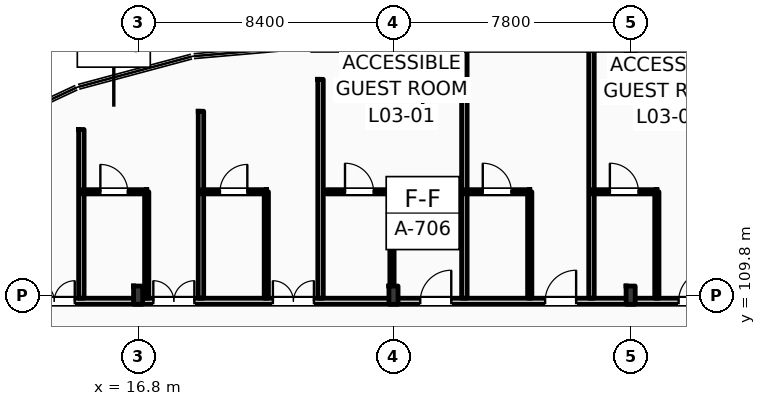
"""IFC4 building model, lengths in metres.
Left out: names, types, materials, properties, quantities, classifications, styles, units other than length and angle.
Written with IfcOpenShell. Run it as: python <this file> out.ifc"""

import sys

from ifc_helpers import new_model, si_unit, direction, frame, frame_2d, origin, origin_2d, place, context, subcontext, project, spatial, rectangle, i_section, extrude, element, fill, save


model = new_model("IFC4")
c1 = context("Model", 3, precision=1e-05, world=origin(), true_north=direction((0.0, 1.0)))
c2 = subcontext(c1, "Body", "Model", "MODEL_VIEW")
j1 = project(units=[si_unit("LENGTHUNIT", "METRE"), si_unit("PLANEANGLEUNIT", "RADIAN")], contexts=[c1])
p1 = place(None, origin())
s1 = spatial("IfcSite", under=j1, at=p1, CompositionType="ELEMENT")
p2 = place(p1, origin())
s2 = spatial("IfcBuilding", under=s1, at=p2, CompositionType="ELEMENT")
p3 = place(p2, frame((0.0, 0.0, 16.2)))
s3 = spatial("IfcBuildingStorey", under=s2, at=p3, CompositionType="ELEMENT", Elevation=16.2)
for number, where, z_axis, x_axis in (
    (1, (16.8, 109.8, 0.0), (0.0, 0.0, 1.0), (1.0, 0.0, 0.0)),
    (2, (25.2, 109.8, 0.0), (0.0, 0.0, 1.0), (1.0, 0.0, 0.0)),
):
    element("IfcColumn", number, at=place(p3, frame(where, z_axis=z_axis, x_axis=x_axis)), inside=s3, PredefinedType="COLUMN", context=c2, shape_type="SweptSolid", body=[
        extrude(i_section(OverallWidth=0.3, OverallDepth=0.6, WebThickness=0.015, FlangeThickness=0.03, FilletRadius=0.027, at=origin_2d()), origin(), (0.0, 0.0, 1.0), 4.2),
    ])
p4 = place(p3, frame((25.2, 118.0, 0.0), z_axis=(0.0, 0.0, 1.0), x_axis=(1.0, 0.0, 0.0)))
e3 = element("IfcColumn", 3, at=p4, inside=s3, PredefinedType="COLUMN", context=c2, shape_type="SweptSolid", body=[
    extrude(i_section(OverallWidth=0.3, OverallDepth=0.55, WebThickness=0.015, FlangeThickness=0.029, FilletRadius=0.027, at=origin_2d()), origin(), (0.0, 0.0, 1.0), 4.2),
])
p5 = place(p3, frame((33.0, 109.8, 0.0), z_axis=(0.0, 0.0, 1.0), x_axis=(1.0, 0.0, 0.0)))
e4 = element("IfcColumn", 4, at=p5, inside=s3, PredefinedType="COLUMN", context=c2, shape_type="SweptSolid", body=[
    extrude(i_section(OverallWidth=0.3, OverallDepth=0.6, WebThickness=0.015, FlangeThickness=0.03, FilletRadius=0.027, at=origin_2d()), origin(), (0.0, 0.0, 1.0), 4.2),
])
p6 = place(p3, frame((33.0, 118.0, 0.0), z_axis=(0.0, 0.0, 1.0), x_axis=(1.0, 0.0, 0.0)))
e5 = element("IfcColumn", 5, at=p6, inside=s3, PredefinedType="COLUMN", context=c2, shape_type="SweptSolid", body=[
    extrude(i_section(OverallWidth=0.3, OverallDepth=0.55, WebThickness=0.015, FlangeThickness=0.029, FilletRadius=0.027, at=origin_2d()), origin(), (0.0, 0.0, 1.0), 4.2),
])
p7 = place(p3, frame((10.65, 109.6, 0.0), z_axis=(0.0, 0.0, 1.0), x_axis=(1.0, 0.0, 0.0)))
e6 = element("IfcWall", 6, at=p7, inside=s3, PredefinedType="PARTITIONING", context=c2, shape_type="SweptSolid", body=[
    extrude(rectangle(XDim=109.21, YDim=0.2, at=frame_2d((54.605, 0.0))), origin(), (0.0, 0.0, 1.0), 3.36),
])
p8 = place(p7, frame((15.43, 0.0, 0.0)))
e7 = element("IfcOpeningElement", 7, at=p8, cuts=e6, PredefinedType="OPENING", context=c2, shape_type="SweptSolid", body=[
    extrude(rectangle(XDim=1.02, YDim=2.2, at=frame_2d((0.51, 1.1))), frame((0.0, 0.11, 0.0), z_axis=(0.0, -1.0, 0.0), x_axis=(1.0, 0.0, 0.0)), (0.0, 0.0, 1.0), 0.22),
])
p9 = place(p7, frame((19.537, 0.0, 0.0)))
e8 = element("IfcOpeningElement", 8, at=p9, cuts=e6, PredefinedType="OPENING", context=c2, shape_type="SweptSolid", body=[
    extrude(rectangle(XDim=1.02, YDim=2.2, at=frame_2d((0.51, 1.1))), frame((0.0, 0.11, 0.0), z_axis=(0.0, -1.0, 0.0), x_axis=(1.0, 0.0, 0.0)), (0.0, 0.0, 1.0), 0.22),
])
p10 = place(p7, frame((23.928, 0.0, 0.0)))
e9 = element("IfcOpeningElement", 9, at=p10, cuts=e6, PredefinedType="OPENING", context=c2, shape_type="SweptSolid", body=[
    extrude(rectangle(XDim=1.02, YDim=2.2, at=frame_2d((0.51, 1.1))), frame((0.0, 0.11, 0.0), z_axis=(0.0, -1.0, 0.0), x_axis=(1.0, 0.0, 0.0)), (0.0, 0.0, 1.0), 0.22),
])
p11 = place(p7, frame((26.169, 0.0, 0.0)))
e10 = element("IfcOpeningElement", 10, at=p11, cuts=e6, PredefinedType="OPENING", context=c2, shape_type="SweptSolid", body=[
    extrude(rectangle(XDim=1.02, YDim=2.2, at=frame_2d((0.51, 1.1))), frame((0.0, 0.11, 0.0), z_axis=(0.0, -1.0, 0.0), x_axis=(1.0, 0.0, 0.0)), (0.0, 0.0, 1.0), 0.22),
])
p12 = place(p7, frame((32.739, 0.0, 0.0)))
e11 = element("IfcOpeningElement", 11, at=p12, cuts=e6, PredefinedType="OPENING", context=c2, shape_type="SweptSolid", body=[
    extrude(rectangle(XDim=0.96, YDim=2.2, at=frame_2d((0.48, 1.1))), frame((0.0, 0.11, 0.0), z_axis=(0.0, -1.0, 0.0), x_axis=(1.0, 0.0, 0.0)), (0.0, 0.0, 1.0), 0.22),
])
p13 = place(p7, frame((34.98, 0.0, 0.0)))
e12 = element("IfcOpeningElement", 12, at=p13, cuts=e6, PredefinedType="OPENING", context=c2, shape_type="SweptSolid", body=[
    extrude(rectangle(XDim=0.96, YDim=2.2, at=frame_2d((0.48, 1.1))), frame((0.0, 0.11, 0.0), z_axis=(0.0, -1.0, 0.0), x_axis=(1.0, 0.0, 0.0)), (0.0, 0.0, 1.0), 0.22),
])
p14 = place(p7, frame((41.521, 0.0, 0.0)))
e13 = element("IfcOpeningElement", 13, at=p14, cuts=e6, PredefinedType="OPENING", context=c2, shape_type="SweptSolid", body=[
    extrude(rectangle(XDim=0.96, YDim=2.2, at=frame_2d((0.48, 1.1))), frame((0.0, 0.11, 0.0), z_axis=(0.0, -1.0, 0.0), x_axis=(1.0, 0.0, 0.0)), (0.0, 0.0, 1.0), 0.22),
])
p15 = place(p7, frame((43.512, 0.0, 0.0)))
e14 = element("IfcOpeningElement", 14, at=p15, cuts=e6, PredefinedType="OPENING", context=c2, shape_type="SweptSolid", body=[
    extrude(rectangle(XDim=0.96, YDim=2.2, at=frame_2d((0.48, 1.1))), frame((0.0, 0.11, 0.0), z_axis=(0.0, -1.0, 0.0), x_axis=(1.0, 0.0, 0.0)), (0.0, 0.0, 1.0), 0.22),
])
p16 = place(p7, frame((50.303, 0.0, 0.0)))
e15 = element("IfcOpeningElement", 15, at=p16, cuts=e6, PredefinedType="OPENING", context=c2, shape_type="SweptSolid", body=[
    extrude(rectangle(XDim=0.96, YDim=2.2, at=frame_2d((0.48, 1.1))), frame((0.0, 0.11, 0.0), z_axis=(0.0, -1.0, 0.0), x_axis=(1.0, 0.0, 0.0)), (0.0, 0.0, 1.0), 0.22),
])
p17 = place(p7, frame((54.944, 0.0, 0.0)))
e16 = element("IfcOpeningElement", 16, at=p17, cuts=e6, PredefinedType="OPENING", context=c2, shape_type="SweptSolid", body=[
    extrude(rectangle(XDim=0.96, YDim=2.2, at=frame_2d((0.48, 1.1))), frame((0.0, 0.11, 0.0), z_axis=(0.0, -1.0, 0.0), x_axis=(1.0, 0.0, 0.0)), (0.0, 0.0, 1.0), 0.22),
])
p18 = place(p7, frame((59.085, 0.0, 0.0)))
e17 = element("IfcOpeningElement", 17, at=p18, cuts=e6, PredefinedType="OPENING", context=c2, shape_type="SweptSolid", body=[
    extrude(rectangle(XDim=0.96, YDim=2.2, at=frame_2d((0.48, 1.1))), frame((0.0, 0.11, 0.0), z_axis=(0.0, -1.0, 0.0), x_axis=(1.0, 0.0, 0.0)), (0.0, 0.0, 1.0), 0.22),
])
p19 = place(p7, frame((63.476, 0.0, 0.0)))
e18 = element("IfcOpeningElement", 18, at=p19, cuts=e6, PredefinedType="OPENING", context=c2, shape_type="SweptSolid", body=[
    extrude(rectangle(XDim=0.96, YDim=2.2, at=frame_2d((0.48, 1.1))), frame((0.0, 0.11, 0.0), z_axis=(0.0, -1.0, 0.0), x_axis=(1.0, 0.0, 0.0)), (0.0, 0.0, 1.0), 0.22),
])
p20 = place(p7, frame((65.716, 0.0, 0.0)))
e19 = element("IfcOpeningElement", 19, at=p20, cuts=e6, PredefinedType="OPENING", context=c2, shape_type="SweptSolid", body=[
    extrude(rectangle(XDim=0.96, YDim=2.2, at=frame_2d((0.48, 1.1))), frame((0.0, 0.11, 0.0), z_axis=(0.0, -1.0, 0.0), x_axis=(1.0, 0.0, 0.0)), (0.0, 0.0, 1.0), 0.22),
])
p21 = place(p7, frame((72.257, 0.0, 0.0)))
e20 = element("IfcOpeningElement", 20, at=p21, cuts=e6, PredefinedType="OPENING", context=c2, shape_type="SweptSolid", body=[
    extrude(rectangle(XDim=0.96, YDim=2.2, at=frame_2d((0.48, 1.1))), frame((0.0, 0.11, 0.0), z_axis=(0.0, -1.0, 0.0), x_axis=(1.0, 0.0, 0.0)), (0.0, 0.0, 1.0), 0.22),
])
p22 = place(p7, frame((74.498, 0.0, 0.0)))
e21 = element("IfcOpeningElement", 21, at=p22, cuts=e6, PredefinedType="OPENING", context=c2, shape_type="SweptSolid", body=[
    extrude(rectangle(XDim=0.96, YDim=2.2, at=frame_2d((0.48, 1.1))), frame((0.0, 0.11, 0.0), z_axis=(0.0, -1.0, 0.0), x_axis=(1.0, 0.0, 0.0)), (0.0, 0.0, 1.0), 0.22),
])
p23 = place(p7, frame((81.039, 0.0, 0.0)))
e22 = element("IfcOpeningElement", 22, at=p23, cuts=e6, PredefinedType="OPENING", context=c2, shape_type="SweptSolid", body=[
    extrude(rectangle(XDim=0.96, YDim=2.2, at=frame_2d((0.48, 1.1))), frame((0.0, 0.11, 0.0), z_axis=(0.0, -1.0, 0.0), x_axis=(1.0, 0.0, 0.0)), (0.0, 0.0, 1.0), 0.22),
])
p24 = place(p7, frame((85.68, 0.0, 0.0)))
e23 = element("IfcOpeningElement", 23, at=p24, cuts=e6, PredefinedType="OPENING", context=c2, shape_type="SweptSolid", body=[
    extrude(rectangle(XDim=0.96, YDim=2.2, at=frame_2d((0.48, 1.1))), frame((0.0, 0.11, 0.0), z_axis=(0.0, -1.0, 0.0), x_axis=(1.0, 0.0, 0.0)), (0.0, 0.0, 1.0), 0.22),
])
p25 = place(p7, frame((89.82, 0.0, 0.0)))
e24 = element("IfcOpeningElement", 24, at=p25, cuts=e6, PredefinedType="OPENING", context=c2, shape_type="SweptSolid", body=[
    extrude(rectangle(XDim=0.96, YDim=2.2, at=frame_2d((0.48, 1.1))), frame((0.0, 0.11, 0.0), z_axis=(0.0, -1.0, 0.0), x_axis=(1.0, 0.0, 0.0)), (0.0, 0.0, 1.0), 0.22),
])
p26 = place(p7, frame((94.211, 0.0, 0.0)))
e25 = element("IfcOpeningElement", 25, at=p26, cuts=e6, PredefinedType="OPENING", context=c2, shape_type="SweptSolid", body=[
    extrude(rectangle(XDim=0.96, YDim=2.2, at=frame_2d((0.48, 1.1))), frame((0.0, 0.11, 0.0), z_axis=(0.0, -1.0, 0.0), x_axis=(1.0, 0.0, 0.0)), (0.0, 0.0, 1.0), 0.22),
])
p27 = place(p7, frame((98.602, 0.0, 0.0)))
e26 = element("IfcOpeningElement", 26, at=p27, cuts=e6, PredefinedType="OPENING", context=c2, shape_type="SweptSolid", body=[
    extrude(rectangle(XDim=0.96, YDim=2.2, at=frame_2d((0.48, 1.1))), frame((0.0, 0.11, 0.0), z_axis=(0.0, -1.0, 0.0), x_axis=(1.0, 0.0, 0.0)), (0.0, 0.0, 1.0), 0.22),
])
p28 = place(p7, frame((102.993, 0.0, 0.0)))
e27 = element("IfcOpeningElement", 27, at=p28, cuts=e6, PredefinedType="OPENING", context=c2, shape_type="SweptSolid", body=[
    extrude(rectangle(XDim=0.96, YDim=2.2, at=frame_2d((0.48, 1.1))), frame((0.0, 0.11, 0.0), z_axis=(0.0, -1.0, 0.0), x_axis=(1.0, 0.0, 0.0)), (0.0, 0.0, 1.0), 0.22),
])
p29 = place(p7, frame((105.269, 0.0, 0.0)))
e28 = element("IfcOpeningElement", 28, at=p29, cuts=e6, PredefinedType="OPENING", context=c2, shape_type="SweptSolid", body=[
    extrude(rectangle(XDim=0.96, YDim=2.2, at=frame_2d((0.48, 1.1))), frame((0.0, 0.11, 0.0), z_axis=(0.0, -1.0, 0.0), x_axis=(1.0, 0.0, 0.0)), (0.0, 0.0, 1.0), 0.22),
])
p30 = place(p7, frame((2.716, 0.0, 0.0)))
e29 = element("IfcOpeningElement", 29, at=p30, cuts=e6, PredefinedType="OPENING", context=c2, shape_type="SweptSolid", body=[
    extrude(rectangle(XDim=1.35, YDim=2.25, at=frame_2d((0.675, 1.125))), frame((0.0, 0.11, 0.0), z_axis=(0.0, -1.0, 0.0), x_axis=(1.0, 0.0, 0.0)), (0.0, 0.0, 1.0), 0.22),
])
p31 = place(p7, frame((6.65, 0.0, 0.0)))
e30 = element("IfcOpeningElement", 30, at=p31, cuts=e6, PredefinedType="OPENING", context=c2, shape_type="SweptSolid", body=[
    extrude(rectangle(XDim=1.35, YDim=2.25, at=frame_2d((0.675, 1.125))), frame((0.0, 0.11, 0.0), z_axis=(0.0, -1.0, 0.0), x_axis=(1.0, 0.0, 0.0)), (0.0, 0.0, 1.0), 0.22),
])
p32 = place(p7, frame((10.583, 0.0, 0.0)))
e31 = element("IfcOpeningElement", 31, at=p32, cuts=e6, PredefinedType="OPENING", context=c2, shape_type="SweptSolid", body=[
    extrude(rectangle(XDim=1.35, YDim=2.25, at=frame_2d((0.675, 1.125))), frame((0.0, 0.11, 0.0), z_axis=(0.0, -1.0, 0.0), x_axis=(1.0, 0.0, 0.0)), (0.0, 0.0, 1.0), 0.22),
])
p33 = place(p3, frame((27.531, 109.7, 0.0), z_axis=(0.0, 0.0, 1.0), x_axis=(0.0, 1.0, 0.0)))
e32 = element("IfcWall", 32, at=p33, inside=s3, PredefinedType="PARTITIONING", context=c2, shape_type="SweptSolid", body=[
    extrude(rectangle(XDim=8.15, YDim=0.18, at=frame_2d((4.075, 0.0))), origin(), (0.0, 0.0, 1.0), 3.92),
])
p34 = place(p3, frame((25.15, 109.7, 0.0), z_axis=(0.0, 0.0, 1.0), x_axis=(0.0, 1.0, 0.0)))
e33 = element("IfcWall", 33, at=p34, inside=s3, PredefinedType="PARTITIONING", context=c2, shape_type="SweptSolid", body=[
    extrude(rectangle(XDim=3.5, YDim=0.14, at=frame_2d((1.75, 0.0))), origin(), (0.0, 0.0, 1.0), 3.51),
])
p35 = place(p3, frame((23.0, 113.2, 0.0), z_axis=(0.0, 0.0, 1.0), x_axis=(1.0, 0.0, 0.0)))
e34 = element("IfcWall", 34, at=p35, inside=s3, PredefinedType="PARTITIONING", context=c2, shape_type="SweptSolid", body=[
    extrude(rectangle(XDim=2.15, YDim=0.14, at=frame_2d((1.075, 0.0))), origin(), (0.0, 0.0, 1.0), 3.92),
])
p36 = place(p35, frame((0.605, 0.0, 0.0)))
e35 = element("IfcOpeningElement", 35, at=p36, cuts=e34, PredefinedType="OPENING", context=c2, shape_type="SweptSolid", body=[
    extrude(rectangle(XDim=0.94, YDim=2.15, at=frame_2d((0.47, 1.075))), frame((0.0, 0.08, 0.0), z_axis=(0.0, -1.0, 0.0), x_axis=(1.0, 0.0, 0.0)), (0.0, 0.0, 1.0), 0.16),
])
p37 = place(p3, frame((31.712, 109.7, 0.0), z_axis=(0.0, 0.0, 1.0), x_axis=(0.0, 1.0, 0.0)))
e36 = element("IfcWall", 36, at=p37, inside=s3, PredefinedType="PARTITIONING", context=c2, shape_type="SweptSolid", body=[
    extrude(rectangle(XDim=8.15, YDim=0.18, at=frame_2d((4.075, 0.0))), origin(), (0.0, 0.0, 1.0), 3.92),
])
p38 = place(p3, frame((29.681, 109.7, 0.0), z_axis=(0.0, 0.0, 1.0), x_axis=(0.0, 1.0, 0.0)))
e37 = element("IfcWall", 37, at=p38, inside=s3, PredefinedType="PARTITIONING", context=c2, shape_type="SweptSolid", body=[
    extrude(rectangle(XDim=3.5, YDim=0.14, at=frame_2d((1.75, 0.0))), origin(), (0.0, 0.0, 1.0), 3.92),
])
p39 = place(p3, frame((27.531, 113.2, 0.0), z_axis=(0.0, 0.0, 1.0), x_axis=(1.0, 0.0, 0.0)))
e38 = element("IfcWall", 38, at=p39, inside=s3, PredefinedType="PARTITIONING", context=c2, shape_type="SweptSolid", body=[
    extrude(rectangle(XDim=2.15, YDim=0.14, at=frame_2d((1.075, 0.0))), origin(), (0.0, 0.0, 1.0), 3.92),
])
p40 = place(p39, frame((0.605, 0.0, 0.0)))
e39 = element("IfcOpeningElement", 39, at=p40, cuts=e38, PredefinedType="OPENING", context=c2, shape_type="SweptSolid", body=[
    extrude(rectangle(XDim=0.94, YDim=2.15, at=frame_2d((0.47, 1.075))), frame((0.0, 0.08, 0.0), z_axis=(0.0, -1.0, 0.0), x_axis=(1.0, 0.0, 0.0)), (0.0, 0.0, 1.0), 0.16),
])
p41 = place(p3, frame((33.862, 109.7, 0.0), z_axis=(0.0, 0.0, 1.0), x_axis=(0.0, 1.0, 0.0)))
e40 = element("IfcWall", 40, at=p41, inside=s3, PredefinedType="PARTITIONING", context=c2, shape_type="SweptSolid", body=[
    extrude(rectangle(XDim=3.5, YDim=0.14, at=frame_2d((1.75, 0.0))), origin(), (0.0, 0.0, 1.0), 3.92),
])
p42 = place(p3, frame((31.712, 113.2, 0.0), z_axis=(0.0, 0.0, 1.0), x_axis=(1.0, 0.0, 0.0)))
e41 = element("IfcWall", 41, at=p42, inside=s3, PredefinedType="PARTITIONING", context=c2, shape_type="SweptSolid", body=[
    extrude(rectangle(XDim=2.15, YDim=0.14, at=frame_2d((1.075, 0.0))), origin(), (0.0, 0.0, 1.0), 3.92),
])
p43 = place(p42, frame((0.605, 0.0, 0.0)))
e42 = element("IfcOpeningElement", 42, at=p43, cuts=e41, PredefinedType="OPENING", context=c2, shape_type="SweptSolid", body=[
    extrude(rectangle(XDim=0.94, YDim=2.15, at=frame_2d((0.47, 1.075))), frame((0.0, 0.08, 0.0), z_axis=(0.0, -1.0, 0.0), x_axis=(1.0, 0.0, 0.0)), (0.0, 0.0, 1.0), 0.16),
])
p44 = place(p3, frame((14.933, 109.7, 0.0), z_axis=(0.0, 0.0, 1.0), x_axis=(0.0, 1.0, 0.0)))
e43 = element("IfcWall", 43, at=p44, inside=s3, PredefinedType="PARTITIONING", context=c2, shape_type="SweptSolid", body=[
    extrude(rectangle(XDim=5.55, YDim=0.18, at=frame_2d((2.775, 0.0))), origin(), (0.0, 0.0, 1.0), 3.92),
])
p45 = place(p3, frame((18.867, 109.7, 0.0), z_axis=(0.0, 0.0, 1.0), x_axis=(0.0, 1.0, 0.0)))
e44 = element("IfcWall", 44, at=p45, inside=s3, PredefinedType="PARTITIONING", context=c2, shape_type="SweptSolid", body=[
    extrude(rectangle(XDim=6.15, YDim=0.18, at=frame_2d((3.075, 0.0))), origin(), (0.0, 0.0, 1.0), 3.92),
])
p46 = place(p3, frame((17.083, 109.7, 0.0), z_axis=(0.0, 0.0, 1.0), x_axis=(0.0, 1.0, 0.0)))
e45 = element("IfcWall", 45, at=p46, inside=s3, PredefinedType="PARTITIONING", context=c2, shape_type="SweptSolid", body=[
    extrude(rectangle(XDim=3.5, YDim=0.14, at=frame_2d((1.75, 0.0))), origin(), (0.0, 0.0, 1.0), 3.92),
])
p47 = place(p3, frame((14.933, 113.2, 0.0), z_axis=(0.0, 0.0, 1.0), x_axis=(1.0, 0.0, 0.0)))
e46 = element("IfcWall", 46, at=p47, inside=s3, PredefinedType="PARTITIONING", context=c2, shape_type="SweptSolid", body=[
    extrude(rectangle(XDim=2.15, YDim=0.14, at=frame_2d((1.075, 0.0))), origin(), (0.0, 0.0, 1.0), 3.92),
])
p48 = place(p47, frame((0.625, 0.0, 0.0)))
e47 = element("IfcOpeningElement", 47, at=p48, cuts=e46, PredefinedType="OPENING", context=c2, shape_type="SweptSolid", body=[
    extrude(rectangle(XDim=0.9, YDim=2.1, at=frame_2d((0.45, 1.05))), frame((0.0, 0.08, 0.0), z_axis=(0.0, -1.0, 0.0), x_axis=(1.0, 0.0, 0.0)), (0.0, 0.0, 1.0), 0.16),
])
p49 = place(p3, frame((22.8, 109.7, 0.0), z_axis=(0.0, 0.0, 1.0), x_axis=(0.0, 1.0, 0.0)))
e48 = element("IfcWall", 48, at=p49, inside=s3, PredefinedType="PARTITIONING", context=c2, shape_type="SweptSolid", body=[
    extrude(rectangle(XDim=7.2, YDim=0.18, at=frame_2d((3.6, 0.0))), origin(), (0.0, 0.0, 1.0), 3.92),
])
p50 = place(p3, frame((21.017, 109.7, 0.0), z_axis=(0.0, 0.0, 1.0), x_axis=(0.0, 1.0, 0.0)))
e49 = element("IfcWall", 49, at=p50, inside=s3, PredefinedType="PARTITIONING", context=c2, shape_type="SweptSolid", body=[
    extrude(rectangle(XDim=3.5, YDim=0.14, at=frame_2d((1.75, 0.0))), origin(), (0.0, 0.0, 1.0), 3.92),
])
p51 = place(p3, frame((18.867, 113.2, 0.0), z_axis=(0.0, 0.0, 1.0), x_axis=(1.0, 0.0, 0.0)))
e50 = element("IfcWall", 50, at=p51, inside=s3, PredefinedType="PARTITIONING", context=c2, shape_type="SweptSolid", body=[
    extrude(rectangle(XDim=2.15, YDim=0.14, at=frame_2d((1.075, 0.0))), origin(), (0.0, 0.0, 1.0), 3.92),
])
p52 = place(p51, frame((0.625, 0.0, 0.0)))
e51 = element("IfcOpeningElement", 51, at=p52, cuts=e50, PredefinedType="OPENING", context=c2, shape_type="SweptSolid", body=[
    extrude(rectangle(XDim=0.9, YDim=2.1, at=frame_2d((0.45, 1.05))), frame((0.0, 0.08, 0.0), z_axis=(0.0, -1.0, 0.0), x_axis=(1.0, 0.0, 0.0)), (0.0, 0.0, 1.0), 0.16),
])
p53 = place(p8, origin())
e52 = element("IfcDoor", 52, at=p53, inside=s3, OperationType="SINGLE_SWING_RIGHT", PredefinedType="DOOR", context=c2, shape_type="SweptSolid", body=[
    extrude(rectangle(XDim=1.02, YDim=2.2, at=frame_2d((0.51, 1.1))), frame((0.0, 0.025, 0.0), z_axis=(0.0, -1.0, 0.0), x_axis=(1.0, 0.0, 0.0)), (0.0, 0.0, 1.0), 0.05),
])
fill(e7, e52)
p54 = place(p36, origin())
e53 = element("IfcDoor", 53, at=p54, inside=s3, OperationType="SINGLE_SWING_LEFT", PredefinedType="DOOR", context=c2, shape_type="SweptSolid", body=[
    extrude(rectangle(XDim=0.94, YDim=2.15, at=frame_2d((0.47, 1.075))), frame((0.0, 0.025, 0.0), z_axis=(0.0, -1.0, 0.0), x_axis=(1.0, 0.0, 0.0)), (0.0, 0.0, 1.0), 0.05),
])
fill(e35, e53)
p55 = place(p9, origin())
e54 = element("IfcDoor", 54, at=p55, inside=s3, OperationType="SINGLE_SWING_RIGHT", PredefinedType="DOOR", context=c2, shape_type="SweptSolid", body=[
    extrude(rectangle(XDim=1.02, YDim=2.2, at=frame_2d((0.51, 1.1))), frame((0.0, 0.025, 0.0), z_axis=(0.0, -1.0, 0.0), x_axis=(1.0, 0.0, 0.0)), (0.0, 0.0, 1.0), 0.05),
])
fill(e8, e54)
p56 = place(p40, origin())
e55 = element("IfcDoor", 55, at=p56, inside=s3, OperationType="SINGLE_SWING_LEFT", PredefinedType="DOOR", context=c2, shape_type="SweptSolid", body=[
    extrude(rectangle(XDim=0.94, YDim=2.15, at=frame_2d((0.47, 1.075))), frame((0.0, 0.025, 0.0), z_axis=(0.0, -1.0, 0.0), x_axis=(1.0, 0.0, 0.0)), (0.0, 0.0, 1.0), 0.05),
])
fill(e39, e55)
p57 = place(p10, origin())
e56 = element("IfcDoor", 56, at=p57, inside=s3, OperationType="SINGLE_SWING_RIGHT", PredefinedType="DOOR", context=c2, shape_type="SweptSolid", body=[
    extrude(rectangle(XDim=1.02, YDim=2.2, at=frame_2d((0.51, 1.1))), frame((0.0, 0.025, 0.0), z_axis=(0.0, -1.0, 0.0), x_axis=(1.0, 0.0, 0.0)), (0.0, 0.0, 1.0), 0.05),
])
fill(e9, e56)
p58 = place(p43, origin())
e57 = element("IfcDoor", 57, at=p58, inside=s3, OperationType="SINGLE_SWING_LEFT", PredefinedType="DOOR", context=c2, shape_type="SweptSolid", body=[
    extrude(rectangle(XDim=0.94, YDim=2.15, at=frame_2d((0.47, 1.075))), frame((0.0, 0.025, 0.0), z_axis=(0.0, -1.0, 0.0), x_axis=(1.0, 0.0, 0.0)), (0.0, 0.0, 1.0), 0.05),
])
fill(e42, e57)
p59 = place(p30, origin())
e58 = element("IfcDoor", 58, at=p59, inside=s3, OperationType="DOUBLE_SWING_LEFT", PredefinedType="DOOR", context=c2, shape_type="SweptSolid", body=[
    extrude(rectangle(XDim=1.35, YDim=2.25, at=frame_2d((0.675, 1.125))), frame((0.0, 0.025, 0.0), z_axis=(0.0, -1.0, 0.0), x_axis=(1.0, 0.0, 0.0)), (0.0, 0.0, 1.0), 0.05),
])
fill(e29, e58)
p60 = place(p31, origin())
e59 = element("IfcDoor", 59, at=p60, inside=s3, OperationType="DOUBLE_SWING_LEFT", PredefinedType="DOOR", context=c2, shape_type="SweptSolid", body=[
    extrude(rectangle(XDim=1.35, YDim=2.25, at=frame_2d((0.675, 1.125))), frame((0.0, 0.025, 0.0), z_axis=(0.0, -1.0, 0.0), x_axis=(1.0, 0.0, 0.0)), (0.0, 0.0, 1.0), 0.05),
])
fill(e30, e59)
p61 = place(p48, origin())
e60 = element("IfcDoor", 60, at=p61, inside=s3, OperationType="SINGLE_SWING_LEFT", PredefinedType="DOOR", context=c2, shape_type="SweptSolid", body=[
    extrude(rectangle(XDim=0.9, YDim=2.1, at=frame_2d((0.45, 1.05))), frame((0.0, 0.025, 0.0), z_axis=(0.0, -1.0, 0.0), x_axis=(1.0, 0.0, 0.0)), (0.0, 0.0, 1.0), 0.05),
])
fill(e47, e60)
p62 = place(p32, origin())
e61 = element("IfcDoor", 61, at=p62, inside=s3, OperationType="DOUBLE_SWING_LEFT", PredefinedType="DOOR", context=c2, shape_type="SweptSolid", body=[
    extrude(rectangle(XDim=1.35, YDim=2.25, at=frame_2d((0.675, 1.125))), frame((0.0, 0.025, 0.0), z_axis=(0.0, -1.0, 0.0), x_axis=(1.0, 0.0, 0.0)), (0.0, 0.0, 1.0), 0.05),
])
fill(e31, e61)
p63 = place(p52, origin())
e62 = element("IfcDoor", 62, at=p63, inside=s3, OperationType="SINGLE_SWING_RIGHT", PredefinedType="DOOR", context=c2, shape_type="SweptSolid", body=[
    extrude(rectangle(XDim=0.9, YDim=2.1, at=frame_2d((0.45, 1.05))), frame((0.0, 0.025, 0.0), z_axis=(0.0, -1.0, 0.0), x_axis=(1.0, 0.0, 0.0)), (0.0, 0.0, 1.0), 0.05),
])
fill(e51, e62)
save(model, sys.argv[1])
